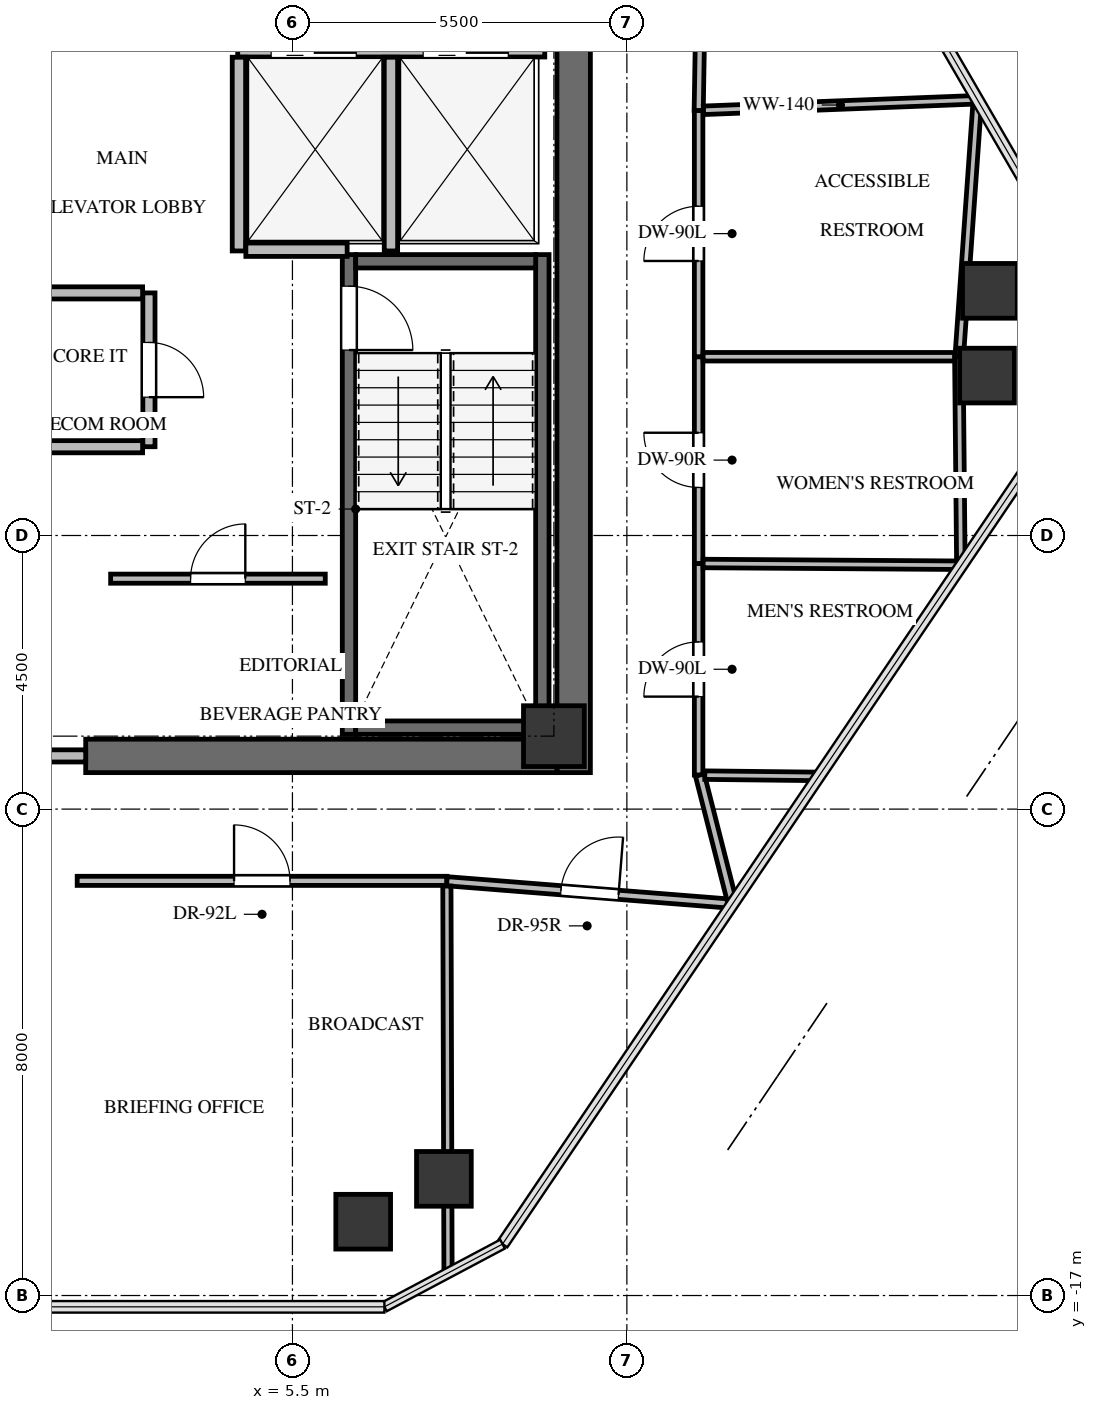
"""IFC4 building model, lengths in metres.
Left out: names, types, materials, properties, quantities, classifications, styles, units other than length and angle.
Written with IfcOpenShell. Run it as: python <this file> out.ifc"""

import sys

from ifc_helpers import new_model, si_unit, direction, frame, frame_2d, origin, origin_2d, place, context, subcontext, project, spatial, rectangle, extrude, source, transform, mapped, element, fill, save


model = new_model("IFC4")
c1 = context("Model", 3, precision=1e-05, world=origin(), true_north=direction((0.0, 1.0)))
c2 = subcontext(c1, "Body", "Model", "MODEL_VIEW")
j1 = project(units=[si_unit("LENGTHUNIT", "METRE"), si_unit("PLANEANGLEUNIT", "RADIAN")], contexts=[c1])
p1 = place(None, origin())
s1 = spatial("IfcSite", under=j1, at=p1, CompositionType="ELEMENT")
p2 = place(p1, origin())
s2 = spatial("IfcBuilding", under=s1, at=p2, CompositionType="ELEMENT")
p3 = place(p2, frame((0.0, 0.0, 228.2)))
s3 = spatial("IfcBuildingStorey", under=s2, at=p3, CompositionType="ELEMENT", Elevation=228.2)
p4 = place(p3, frame((10.125, -8.4, 0.0), z_axis=(0.0, 0.0, 1.0), x_axis=(0.0, 1.0, 0.0)))
e1 = element("IfcWall", 1, at=p4, inside=s3, PredefinedType="SHEAR", context=c2, shape_type="SweptSolid", body=[
    extrude(rectangle(XDim=16.8, YDim=0.55, at=frame_2d((8.4, 0.0))), origin(), (0.0, 0.0, 1.0), 3.3),
])
p5 = place(p3, frame((2.1, -8.125, 0.0), z_axis=(0.0, 0.0, 1.0), x_axis=(1.0, 0.0, 0.0)))
e2 = element("IfcWall", 2, at=p5, inside=s3, PredefinedType="SHEAR", context=c2, shape_type="SweptSolid", body=[
    extrude(rectangle(XDim=7.75, YDim=0.55, at=frame_2d((3.875, 0.0))), origin(), (0.0, 0.0, 1.0), 3.3),
])
p6 = place(p3, frame((9.61, -7.77, -0.24), z_axis=(0.0, 0.0, 1.0), x_axis=(0.0, 1.0, 0.0)))
e3 = element("IfcWall", 3, at=p6, inside=s3, PredefinedType="SHEAR", context=c2, shape_type="SweptSolid", body=[
    extrude(rectangle(XDim=7.89, YDim=0.22, at=frame_2d((3.945, 0.0))), origin(), (0.0, 0.0, 1.0), 3.3),
])
p7 = place(p3, frame((6.43, 0.12, -0.24), z_axis=(0.0, 0.0, 1.0), x_axis=(0.0, -1.0, 0.0)))
e4 = element("IfcWall", 4, at=p7, inside=s3, PredefinedType="SHEAR", context=c2, shape_type="SweptSolid", body=[
    extrude(rectangle(XDim=7.89, YDim=0.22, at=frame_2d((3.945, 0.0))), origin(), (0.0, 0.0, 1.0), 3.3),
])
p8 = place(p7, frame((0.52, 0.0, 0.0)))
e5 = element("IfcOpeningElement", 5, at=p8, cuts=e4, PredefinedType="OPENING", context=c2, shape_type="SweptSolid", body=[
    extrude(rectangle(XDim=1.05, YDim=2.15, at=frame_2d((0.525, 1.075))), frame((0.0, 0.12, 0.0), z_axis=(0.0, -1.0, 0.0), x_axis=(1.0, 0.0, 0.0)), (0.0, 0.0, 1.0), 0.24),
])
for number, where, z_axis, x_axis in (
    (6, (6.54, -7.66, -0.24), (0.0, 0.0, 1.0), (1.0, 0.0, 0.0)),
    (7, (9.5, 0.01, -0.24), (0.0, 0.0, 1.0), (-1.0, 0.0, 0.0)),
):
    element("IfcWall", number, at=place(p3, frame(where, z_axis=z_axis, x_axis=x_axis)), inside=s3, PredefinedType="SHEAR", context=c2, shape_type="SweptSolid", body=[
        extrude(rectangle(XDim=2.96, YDim=0.22, at=frame_2d((1.48, 0.0))), origin(), (0.0, 0.0, 1.0), 3.3),
    ])
m1 = source(origin(), c2, "Body", "SweptSolid", [
    extrude(rectangle(XDim=1.0, YDim=1.0, at=origin_2d()), origin(), (0.0, 0.0, 1.0), 3.3),
])
p9 = place(p3, frame((9.8, -7.8, -0.24), z_axis=(0.0, 0.0, 1.0), x_axis=(1.0, 0.0, 0.0)))
e8 = element("IfcColumn", 8, at=p9, inside=s3, PredefinedType="COLUMN", context=c2, shape_type="MappedRepresentation", body=[
    mapped(m1, transform((0.0, 0.0, 0.0), x_axis=(1.0, 0.0, 0.0), y_axis=(0.0, 1.0, 0.0), z_axis=(0.0, 0.0, 1.0), scale=1.0)),
])
m2 = source(origin(), c2, "Body", "SweptSolid", [
    extrude(rectangle(XDim=0.9, YDim=0.9, at=origin_2d()), origin(), (0.0, 0.0, 1.0), 3.3),
])
for number, where, z_axis, x_axis in (
    (9, (16.97, -0.476, -0.24), (0.0, 0.0, 1.0), (1.0, 0.0, 0.0)),
    (10, (16.922, -1.87, -0.24), (0.0, 0.0, 1.0), (1.0, 0.0, 0.0)),
    (11, (7.991, -15.081, -0.24), (0.0, 0.0, 1.0), (1.0, 0.0, 0.0)),
    (12, (6.664, -15.786, -0.24), (0.0, 0.0, 1.0), (1.0, 0.0, 0.0)),
):
    element("IfcColumn", number, at=place(p3, frame(where, z_axis=z_axis, x_axis=x_axis)), inside=s3, PredefinedType="COLUMN", context=c2, shape_type="MappedRepresentation", body=[
        mapped(m2, transform((0.0, 0.0, 0.0), x_axis=(1.0, 0.0, 0.0), y_axis=(0.0, 1.0, 0.0), z_axis=(0.0, 0.0, 1.0), scale=1.0)),
    ])
p10 = place(p3, frame((-2.1, -8.125, 0.0), z_axis=(0.0, 0.0, 1.0), x_axis=(1.0, 0.0, 0.0)))
e13 = element("IfcWall", 13, at=p10, inside=s3, PredefinedType="SOLIDWALL", context=c2, shape_type="SweptSolid", body=[
    extrude(rectangle(XDim=4.2, YDim=0.2, at=frame_2d((2.1, 0.0))), origin(), (0.0, 0.0, 1.0), 3.045),
])
p11 = place(p10, frame((1.2, 0.0, 0.0)))
e14 = element("IfcOpeningElement", 14, at=p11, cuts=e13, PredefinedType="OPENING", context=c2, shape_type="SweptSolid", body=[
    extrude(rectangle(XDim=1.8, YDim=2.15, at=frame_2d((0.9, 1.075))), frame((0.0, 0.11, 0.0), z_axis=(0.0, -1.0, 0.0), x_axis=(1.0, 0.0, 0.0)), (0.0, 0.0, 1.0), 0.22),
])
p12 = place(p3, frame((4.6, 3.48, 0.0), z_axis=(0.0, 0.0, 1.0), x_axis=(1.0, 0.0, 0.0)))
e15 = element("IfcWall", 15, at=p12, inside=s3, PredefinedType="SOLIDWALL", context=c2, shape_type="SweptSolid", body=[
    extrude(rectangle(XDim=5.05, YDim=0.22, at=frame_2d((2.525, 0.0))), origin(), (0.0, 0.0, 1.0), 3.045),
])
p13 = place(p12, frame((0.55, 0.0, 0.0)))
e16 = element("IfcOpeningElement", 16, at=p13, cuts=e15, PredefinedType="OPENING", context=c2, shape_type="SweptSolid", body=[
    extrude(rectangle(XDim=1.4, YDim=2.15, at=frame_2d((0.7, 1.075))), frame((0.0, 0.12, 0.0), z_axis=(0.0, -1.0, 0.0), x_axis=(1.0, 0.0, 0.0)), (0.0, 0.0, 1.0), 0.24),
])
p14 = place(p12, frame((3.05, 0.0, 0.0)))
e17 = element("IfcOpeningElement", 17, at=p14, cuts=e15, PredefinedType="OPENING", context=c2, shape_type="SweptSolid", body=[
    extrude(rectangle(XDim=1.4, YDim=2.15, at=frame_2d((0.7, 1.075))), frame((0.0, 0.12, 0.0), z_axis=(0.0, -1.0, 0.0), x_axis=(1.0, 0.0, 0.0)), (0.0, 0.0, 1.0), 0.24),
])
for number, where, z_axis, x_axis in (
    (18, (4.62, 0.18, 0.0), (0.0, 0.0, 1.0), (0.0, 1.0, 0.0)),
    (19, (7.12, 0.18, 0.0), (0.0, 0.0, 1.0), (0.0, 1.0, 0.0)),
):
    element("IfcWall", number, at=place(p3, frame(where, z_axis=z_axis, x_axis=x_axis)), inside=s3, PredefinedType="SOLIDWALL", context=c2, shape_type="SweptSolid", body=[
        extrude(rectangle(XDim=3.186, YDim=0.22, at=frame_2d((1.593, 0.0))), origin(), (0.0, 0.0, 1.0), 3.045),
    ])
p15 = place(p3, frame((4.734, 0.2, 0.0), z_axis=(0.0, 0.0, 1.0), x_axis=(1.0, 0.0, 0.0)))
e20 = element("IfcWall", 20, at=p15, inside=s3, PredefinedType="SOLIDWALL", context=c2, shape_type="SweptSolid", body=[
    extrude(rectangle(XDim=1.666, YDim=0.22, at=frame_2d((0.833, 0.0))), origin(), (0.0, 0.0, 1.0), 3.045),
])
p16 = place(p3, frame((2.51, -5.21, 0.0), z_axis=(0.0, 0.0, 1.0), x_axis=(1.0, 0.0, 0.0)))
e21 = element("IfcWall", 21, at=p16, inside=s3, PredefinedType="PARTITIONING", context=c2, shape_type="SweptSolid", body=[
    extrude(rectangle(XDim=3.53, YDim=0.15, at=frame_2d((1.765, 0.0))), origin(), (0.0, 0.0, 1.0), 3.045),
])
p17 = place(p16, frame((1.315, 0.0, 0.0)))
e22 = element("IfcOpeningElement", 22, at=p17, cuts=e21, PredefinedType="OPENING", context=c2, shape_type="SweptSolid", body=[
    extrude(rectangle(XDim=0.9, YDim=2.05, at=frame_2d((0.45, 1.025))), frame((0.0, 0.085, 0.0), z_axis=(0.0, -1.0, 0.0), x_axis=(1.0, 0.0, 0.0)), (0.0, 0.0, 1.0), 0.17),
])
p18 = place(p3, frame((3.14, -0.51, 0.0), z_axis=(0.0, 0.0, 1.0), x_axis=(0.0, -1.0, 0.0)))
e23 = element("IfcWall", 23, at=p18, inside=s3, PredefinedType="SOLIDWALL", context=c2, shape_type="SweptSolid", body=[
    extrude(rectangle(XDim=2.53, YDim=0.2, at=frame_2d((1.265, 0.0))), origin(), (0.0, 0.0, 1.0), 3.045),
])
p19 = place(p18, frame((0.815, 0.0, 0.0)))
e24 = element("IfcOpeningElement", 24, at=p19, cuts=e23, PredefinedType="OPENING", context=c2, shape_type="SweptSolid", body=[
    extrude(rectangle(XDim=0.9, YDim=2.05, at=frame_2d((0.45, 1.025))), frame((0.0, 0.11, 0.0), z_axis=(0.0, -1.0, 0.0), x_axis=(1.0, 0.0, 0.0)), (0.0, 0.0, 1.0), 0.22),
])
for number, where, z_axis, x_axis in (
    (25, (3.036, -3.04, 0.0), (0.0, 0.0, 1.0), (-1.0, 0.0, 0.0)),
    (26, (1.21, -0.51, 0.0), (0.0, 0.0, 1.0), (1.0, 0.0, 0.0)),
):
    element("IfcWall", number, at=place(p3, frame(where, z_axis=z_axis, x_axis=x_axis)), inside=s3, PredefinedType="SOLIDWALL", context=c2, shape_type="SweptSolid", body=[
        extrude(rectangle(XDim=1.826, YDim=0.2, at=frame_2d((0.913, 0.0))), origin(), (0.0, 0.0, 1.0), 3.045),
    ])
p20 = place(p3, frame((12.18, -8.44, 0.0), z_axis=(0.0, 0.0, 1.0), x_axis=(0.0, 1.0, 0.0)))
e27 = element("IfcWall", 27, at=p20, inside=s3, PredefinedType="PARTITIONING", context=c2, shape_type="SweptSolid", body=[
    extrude(rectangle(XDim=3.48, YDim=0.14, at=frame_2d((1.74, 0.0))), origin(), (0.0, 0.0, 1.0), 2.399),
])
p21 = place(p20, frame((1.29, 0.0, 0.0)))
e28 = element("IfcOpeningElement", 28, at=p21, cuts=e27, PredefinedType="OPENING", context=c2, shape_type="SweptSolid", body=[
    extrude(rectangle(XDim=0.9, YDim=2.05, at=frame_2d((0.45, 1.025))), frame((0.0, 0.08, 0.0), z_axis=(0.0, -1.0, 0.0), x_axis=(1.0, 0.0, 0.0)), (0.0, 0.0, 1.0), 0.16),
])
p22 = place(p3, frame((12.18, -4.96, 0.0), z_axis=(0.0, 0.0, 1.0), x_axis=(0.0, 1.0, 0.0)))
e29 = element("IfcWall", 29, at=p22, inside=s3, PredefinedType="PARTITIONING", context=c2, shape_type="SweptSolid", body=[
    extrude(rectangle(XDim=3.4, YDim=0.14, at=frame_2d((1.7, 0.0))), origin(), (0.0, 0.0, 1.0), 3.045),
])
p23 = place(p22, frame((1.25, 0.0, 0.0)))
e30 = element("IfcOpeningElement", 30, at=p23, cuts=e29, PredefinedType="OPENING", context=c2, shape_type="SweptSolid", body=[
    extrude(rectangle(XDim=0.9, YDim=2.05, at=frame_2d((0.45, 1.025))), frame((0.0, 0.08, 0.0), z_axis=(0.0, -1.0, 0.0), x_axis=(1.0, 0.0, 0.0)), (0.0, 0.0, 1.0), 0.16),
])
p24 = place(p3, frame((12.18, -1.56, 0.0), z_axis=(0.0, 0.0, 1.0), x_axis=(0.0, 1.0, 0.0)))
e31 = element("IfcWall", 31, at=p24, inside=s3, PredefinedType="PARTITIONING", context=c2, shape_type="SweptSolid", body=[
    extrude(rectangle(XDim=4.05, YDim=0.14, at=frame_2d((2.025, 0.0))), origin(), (0.0, 0.0, 1.0), 2.301),
])
p25 = place(p24, frame((1.575, 0.0, 0.0)))
e32 = element("IfcOpeningElement", 32, at=p25, cuts=e31, PredefinedType="OPENING", context=c2, shape_type="SweptSolid", body=[
    extrude(rectangle(XDim=0.9, YDim=2.05, at=frame_2d((0.45, 1.025))), frame((0.0, 0.08, 0.0), z_axis=(0.0, -1.0, 0.0), x_axis=(1.0, 0.0, 0.0)), (0.0, 0.0, 1.0), 0.16),
])
p26 = place(p3, frame((1.96, -10.18, 0.0), z_axis=(0.0, 0.0, 1.0), x_axis=(1.0, 0.0, 0.0)))
e33 = element("IfcWall", 33, at=p26, inside=s3, PredefinedType="PARTITIONING", context=c2, shape_type="SweptSolid", body=[
    extrude(rectangle(XDim=6.08, YDim=0.15, at=frame_2d((3.04, 0.0))), origin(), (0.0, 0.0, 1.0), 2.301),
])
p27 = place(p26, frame((2.58, 0.0, 0.0)))
e34 = element("IfcOpeningElement", 34, at=p27, cuts=e33, PredefinedType="OPENING", context=c2, shape_type="SweptSolid", body=[
    extrude(rectangle(XDim=0.92, YDim=2.1, at=frame_2d((0.46, 1.05))), frame((0.0, 0.085, 0.0), z_axis=(0.0, -1.0, 0.0), x_axis=(1.0, 0.0, 0.0)), (0.0, 0.0, 1.0), 0.17),
])
p28 = place(p3, frame((8.04, -10.186, 0.0), z_axis=(0.0, 0.0, 1.0), x_axis=(0.996887981077, -0.078831168868, 0.0)))
e35 = element("IfcWall", 35, at=p28, inside=s3, PredefinedType="PARTITIONING", context=c2, shape_type="SweptSolid", body=[
    extrude(rectangle(XDim=4.714, YDim=0.15, at=frame_2d((2.357, 0.0))), origin(), (0.0, 0.0, 1.0), 2.399),
])
p29 = place(p28, frame((1.882, 0.0, 0.0)))
e36 = element("IfcOpeningElement", 36, at=p29, cuts=e35, PredefinedType="OPENING", context=c2, shape_type="SweptSolid", body=[
    extrude(rectangle(XDim=0.95, YDim=2.1, at=frame_2d((0.475, 1.05))), frame((0.0, 0.085, 0.0), z_axis=(0.0, -1.0, 0.0), x_axis=(1.0, 0.0, 0.0)), (0.0, 0.0, 1.0), 0.17),
])
p30 = place(p3, frame((12.718, -10.477, 0.0), z_axis=(0.0, 0.0, 1.0), x_axis=(-0.246496791887, 0.96914360731, 0.0)))
e37 = element("IfcWall", 37, at=p30, inside=s3, PredefinedType="PARTITIONING", context=c2, shape_type="SweptSolid", body=[
    extrude(rectangle(XDim=2.102, YDim=0.15, at=frame_2d((1.051, 0.0))), origin(), (0.0, 0.0, 1.0), 2.399),
])
p31 = place(p3, frame((12.181, 2.49, 0.0), z_axis=(0.0, 0.0, 1.0), x_axis=(0.016828669653, 0.999858387912, 0.0)))
e38 = element("IfcWall", 38, at=p31, inside=s3, PredefinedType="PARTITIONING", context=c2, shape_type="SweptSolid", body=[
    extrude(rectangle(XDim=7.674, YDim=0.15, at=frame_2d((3.837, 0.0))), origin(), (0.0, 0.0, 1.0), 2.399),
])
p32 = place(p31, frame((3.377, 0.0, 0.0)))
e39 = element("IfcOpeningElement", 39, at=p32, cuts=e38, PredefinedType="OPENING", context=c2, shape_type="SweptSolid", body=[
    extrude(rectangle(XDim=0.92, YDim=2.1, at=frame_2d((0.46, 1.05))), frame((0.0, 0.085, 0.0), z_axis=(0.0, -1.0, 0.0), x_axis=(1.0, 0.0, 0.0)), (0.0, 0.0, 1.0), 0.17),
])
p33 = place(p3, frame((12.254, -4.96, 0.0), z_axis=(0.0, 0.0, 1.0), x_axis=(0.999976630429, -0.006836563198, 0.0)))
e40 = element("IfcWall", 40, at=p33, inside=s3, PredefinedType="PARTITIONING", context=c2, shape_type="SweptSolid", body=[
    extrude(rectangle(XDim=4.25, YDim=0.14, at=frame_2d((2.125, 0.0))), origin(), (0.0, 0.0, 1.0), 2.399),
])
p34 = place(p3, frame((14.156, -8.462, 0.0), z_axis=(0.0, 0.0, 1.0), x_axis=(-0.999935742613, 0.011336253532, 0.0)))
e41 = element("IfcWall", 41, at=p34, inside=s3, PredefinedType="PARTITIONING", context=c2, shape_type="SweptSolid", body=[
    extrude(rectangle(XDim=1.874, YDim=0.14, at=frame_2d((0.937, 0.0))), origin(), (0.0, 0.0, 1.0), 2.399),
])
p35 = place(p3, frame((12.254, -1.56, 0.0), z_axis=(0.0, 0.0, 1.0), x_axis=(1.0, 0.0, 0.0)))
e42 = element("IfcWall", 42, at=p35, inside=s3, PredefinedType="PARTITIONING", context=c2, shape_type="SweptSolid", body=[
    extrude(rectangle(XDim=4.206, YDim=0.14, at=frame_2d((2.103, 0.0))), origin(), (0.0, 0.0, 1.0), 2.301),
])
p36 = place(p3, frame((16.46, -1.56, 0.0), z_axis=(0.0, 0.0, 1.0), x_axis=(0.009604446748, -0.999953876238, 0.0)))
e43 = element("IfcWall", 43, at=p36, inside=s3, PredefinedType="PARTITIONING", context=c2, shape_type="SweptSolid", body=[
    extrude(rectangle(XDim=3.355, YDim=0.14, at=frame_2d((1.678, 0.0))), origin(), (0.0, 0.0, 1.0), 2.301),
])
p37 = place(p3, frame((12.26, 2.493, 0.0), z_axis=(0.0, 0.0, 1.0), x_axis=(0.999256206289, 0.038562082324, 0.0)))
e44 = element("IfcWall", 44, at=p37, inside=s3, PredefinedType="PARTITIONING", context=c2, shape_type="SweptSolid", body=[
    extrude(rectangle(XDim=4.508, YDim=0.14, at=frame_2d((2.254, 0.0))), origin(), (0.0, 0.0, 1.0), 2.399),
])
p38 = place(p3, frame((16.76, 2.593, 0.0), z_axis=(0.0, 0.0, 1.0), x_axis=(-0.07055102187, -0.997508172053, 0.0)))
e45 = element("IfcWall", 45, at=p38, inside=s3, PredefinedType="PARTITIONING", context=c2, shape_type="SweptSolid", body=[
    extrude(rectangle(XDim=4.163, YDim=0.14, at=frame_2d((2.082, 0.0))), origin(), (0.0, 0.0, 1.0), 2.301),
])
p39 = place(p3, frame((8.04, -10.266, 0.0), z_axis=(0.0, 0.0, 1.0), x_axis=(0.002906673097, -0.999995775617, 0.0)))
e46 = element("IfcWall", 46, at=p39, inside=s3, PredefinedType="PARTITIONING", context=c2, shape_type="SweptSolid", body=[
    extrude(rectangle(XDim=4.872, YDim=0.135, at=frame_2d((2.436, 0.0))), origin(), (0.0, 0.0, 1.0), 1.877),
])
p40 = place(p3, frame((8.055, -15.478, 0.0), z_axis=(0.0, 0.0, 1.0), x_axis=(0.002965460378, -0.999995603013, 0.0)))
e47 = element("IfcWall", 47, at=p40, inside=s3, PredefinedType="PARTITIONING", context=c2, shape_type="SweptSolid", body=[
    extrude(rectangle(XDim=1.153, YDim=0.135, at=frame_2d((0.576, 0.0))), origin(), (0.0, 0.0, 1.0), 3.045),
])
p41 = place(p3, frame((8.054, -15.137, 0.0), z_axis=(0.0, 0.0, 1.0), x_axis=(0.002867371725, -0.999995889081, 0.0)))
e48 = element("IfcWall", 48, at=p41, inside=s3, PredefinedType="PARTITIONING", context=c2, shape_type="SweptSolid", body=[
    extrude(rectangle(XDim=0.341, YDim=0.135, at=frame_2d((0.17, 0.0))), origin(), (0.0, 0.0, 1.0), 1.877),
])
m3 = source(origin(), c2, "Body", "SweptSolid", [
    extrude(rectangle(XDim=1.05, YDim=2.15, at=frame_2d((0.525, 1.075))), frame((0.0, 0.025, 0.0), z_axis=(0.0, -1.0, 0.0), x_axis=(1.0, 0.0, 0.0)), (0.0, 0.0, 1.0), 0.05),
])
p42 = place(p8, origin())
e49 = element("IfcDoor", 49, at=p42, inside=s3, OperationType="SINGLE_SWING_RIGHT", PredefinedType="DOOR", context=c2, shape_type="MappedRepresentation", body=[
    mapped(m3, transform((0.0, 0.0, 0.0), x_axis=(1.0, 0.0, 0.0), y_axis=(0.0, 1.0, 0.0), z_axis=(0.0, 0.0, 1.0), scale=1.0)),
])
fill(e5, e49)
m4 = source(origin(), c2, "Body", "SweptSolid", [
    extrude(rectangle(XDim=0.9, YDim=2.05, at=frame_2d((0.45, 1.025))), frame((0.0, 0.025, 0.0), z_axis=(0.0, -1.0, 0.0), x_axis=(1.0, 0.0, 0.0)), (0.0, 0.0, 1.0), 0.05),
])
p43 = place(p17, origin())
e50 = element("IfcDoor", 50, at=p43, inside=s3, OperationType="SINGLE_SWING_RIGHT", PredefinedType="DOOR", context=c2, shape_type="MappedRepresentation", body=[
    mapped(m4, transform((0.0, 0.0, 0.0), x_axis=(1.0, 0.0, 0.0), y_axis=(0.0, 1.0, 0.0), z_axis=(0.0, 0.0, 1.0), scale=1.0)),
])
fill(e22, e50)
p44 = place(p19, origin())
e51 = element("IfcDoor", 51, at=p44, inside=s3, OperationType="SINGLE_SWING_RIGHT", PredefinedType="DOOR", context=c2, shape_type="MappedRepresentation", body=[
    mapped(m4, transform((0.0, 0.0, 0.0), x_axis=(1.0, 0.0, 0.0), y_axis=(0.0, 1.0, 0.0), z_axis=(0.0, 0.0, 1.0), scale=1.0)),
])
fill(e24, e51)
m5 = source(origin(), c2, "Body", "SweptSolid", [
    extrude(rectangle(XDim=0.9, YDim=2.05, at=frame_2d((0.45, 1.025))), frame((0.0, 0.025, 0.0), z_axis=(0.0, -1.0, 0.0), x_axis=(1.0, 0.0, 0.0)), (0.0, 0.0, 1.0), 0.05),
])
p45 = place(p21, origin())
e52 = element("IfcDoor", 52, at=p45, inside=s3, OperationType="SINGLE_SWING_LEFT", PredefinedType="DOOR", context=c2, shape_type="MappedRepresentation", body=[
    mapped(m5, transform((0.0, 0.0, 0.0), x_axis=(1.0, 0.0, 0.0), y_axis=(0.0, 1.0, 0.0), z_axis=(0.0, 0.0, 1.0), scale=1.0)),
])
fill(e28, e52)
m6 = source(origin(), c2, "Body", "SweptSolid", [
    extrude(rectangle(XDim=0.9, YDim=2.05, at=frame_2d((0.45, 1.025))), frame((0.0, 0.025, 0.0), z_axis=(0.0, -1.0, 0.0), x_axis=(1.0, 0.0, 0.0)), (0.0, 0.0, 1.0), 0.05),
])
p46 = place(p23, origin())
e53 = element("IfcDoor", 53, at=p46, inside=s3, OperationType="SINGLE_SWING_RIGHT", PredefinedType="DOOR", context=c2, shape_type="MappedRepresentation", body=[
    mapped(m6, transform((0.0, 0.0, 0.0), x_axis=(1.0, 0.0, 0.0), y_axis=(0.0, 1.0, 0.0), z_axis=(0.0, 0.0, 1.0), scale=1.0)),
])
fill(e30, e53)
p47 = place(p25, origin())
e54 = element("IfcDoor", 54, at=p47, inside=s3, OperationType="SINGLE_SWING_LEFT", PredefinedType="DOOR", context=c2, shape_type="MappedRepresentation", body=[
    mapped(m5, transform((0.0, 0.0, 0.0), x_axis=(1.0, 0.0, 0.0), y_axis=(0.0, 1.0, 0.0), z_axis=(0.0, 0.0, 1.0), scale=1.0)),
])
fill(e32, e54)
m7 = source(origin(), c2, "Body", "SweptSolid", [
    extrude(rectangle(XDim=0.92, YDim=2.1, at=frame_2d((0.46, 1.05))), frame((0.0, 0.025, 0.0), z_axis=(0.0, -1.0, 0.0), x_axis=(1.0, 0.0, 0.0)), (0.0, 0.0, 1.0), 0.05),
])
p48 = place(p27, origin())
e55 = element("IfcDoor", 55, at=p48, inside=s3, OperationType="SINGLE_SWING_LEFT", PredefinedType="DOOR", context=c2, shape_type="MappedRepresentation", body=[
    mapped(m7, transform((0.0, 0.0, 0.0), x_axis=(1.0, 0.0, 0.0), y_axis=(0.0, 1.0, 0.0), z_axis=(0.0, 0.0, 1.0), scale=1.0)),
])
fill(e34, e55)
m8 = source(origin(), c2, "Body", "SweptSolid", [
    extrude(rectangle(XDim=0.95, YDim=2.1, at=frame_2d((0.475, 1.05))), frame((0.0, 0.025, 0.0), z_axis=(0.0, -1.0, 0.0), x_axis=(1.0, 0.0, 0.0)), (0.0, 0.0, 1.0), 0.05),
])
p49 = place(p29, origin())
e56 = element("IfcDoor", 56, at=p49, inside=s3, OperationType="SINGLE_SWING_RIGHT", PredefinedType="DOOR", context=c2, shape_type="MappedRepresentation", body=[
    mapped(m8, transform((0.0, 0.0, 0.0), x_axis=(1.0, 0.0, 0.0), y_axis=(0.0, 1.0, 0.0), z_axis=(0.0, 0.0, 1.0), scale=1.0)),
])
fill(e36, e56)
save(model, sys.argv[1])
